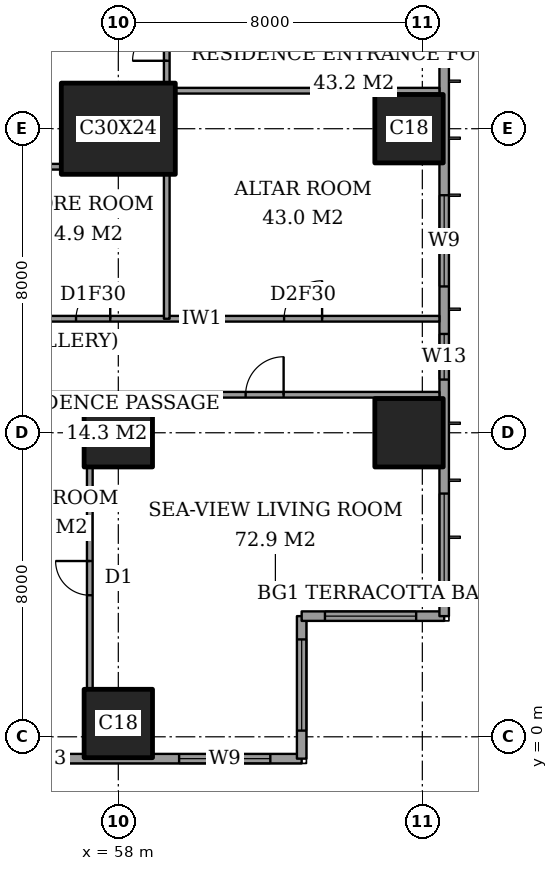
"""IFC4 building model, lengths in metres.
Left out: names, types, materials, properties, quantities, classifications, styles, units other than length and angle.
Written with IfcOpenShell. Run it as: python <this file> out.ifc"""

import sys

from ifc_helpers import new_model, si_unit, direction, frame, frame_2d, origin, origin_2d, place, context, subcontext, project, spatial, rectangle, extrude, element, fill, save


model = new_model("IFC4")
c1 = context("Model", 3, precision=1e-05, world=origin(), true_north=direction((0.0, 1.0)))
c2 = subcontext(c1, "Body", "Model", "MODEL_VIEW")
j1 = project(units=[si_unit("LENGTHUNIT", "METRE"), si_unit("PLANEANGLEUNIT", "RADIAN")], contexts=[c1])
p1 = place(None, origin())
s1 = spatial("IfcSite", under=j1, at=p1, CompositionType="ELEMENT")
p2 = place(p1, origin())
s2 = spatial("IfcBuilding", under=s1, at=p2, CompositionType="ELEMENT")
p3 = place(p2, frame((0.0, 0.0, 218.2)))
s3 = spatial("IfcBuildingStorey", under=s2, at=p3, CompositionType="ELEMENT", Elevation=218.2)
for number, where, z_axis, x_axis in (
    (1, (58.0, 0.35, 0.0), (0.0, 0.0, 1.0), (1.0, 0.0, 0.0)),
    (2, (58.0, 8.0, 0.0), (0.0, 0.0, 1.0), (1.0, 0.0, 0.0)),
):
    element("IfcColumn", number, at=place(p3, frame(where, z_axis=z_axis, x_axis=x_axis)), inside=s3, PredefinedType="COLUMN", context=c2, shape_type="SweptSolid", body=[
        extrude(rectangle(XDim=1.8, YDim=1.8, at=origin_2d()), origin(), (0.0, 0.0, 1.0), 3.6),
    ])
p4 = place(p3, frame((58.0, 16.0, 0.0), z_axis=(0.0, 0.0, 1.0), x_axis=(1.0, 0.0, 0.0)))
e3 = element("IfcColumn", 3, at=p4, inside=s3, PredefinedType="COLUMN", context=c2, shape_type="SweptSolid", body=[
    extrude(rectangle(XDim=3.0, YDim=2.4, at=origin_2d()), origin(), (0.0, 0.0, 1.0), 3.6),
])
for number, where, z_axis, x_axis in (
    (4, (65.65, 8.0, 0.0), (0.0, 0.0, 1.0), (1.0, 0.0, 0.0)),
    (5, (65.65, 16.0, 0.0), (0.0, 0.0, 1.0), (1.0, 0.0, 0.0)),
):
    element("IfcColumn", number, at=place(p3, frame(where, z_axis=z_axis, x_axis=x_axis)), inside=s3, PredefinedType="COLUMN", context=c2, shape_type="SweptSolid", body=[
        extrude(rectangle(XDim=1.8, YDim=1.8, at=origin_2d()), origin(), (0.0, 0.0, 1.0), 3.6),
    ])
p5 = place(p3, frame((41.425, -0.575, 0.0), z_axis=(0.0, 0.0, 1.0), x_axis=(1.0, 0.0, 0.0)))
e6 = element("IfcWall", 6, at=p5, inside=s3, PredefinedType="SOLIDWALL", context=c2, shape_type="SweptSolid", body=[
    extrude(rectangle(XDim=21.4, YDim=0.25, at=frame_2d((10.7, 0.0))), origin(), (0.0, 0.0, 1.0), 3.6),
])
p6 = place(p5, frame((2.65, 0.0, 0.2)))
e7 = element("IfcOpeningElement", 7, at=p6, cuts=e6, PredefinedType="OPENING", context=c2, shape_type="SweptSolid", body=[
    extrude(rectangle(XDim=1.2, YDim=2.4, at=frame_2d((0.6, 1.2))), frame((0.0, 0.135, 0.0), z_axis=(0.0, -1.0, 0.0), x_axis=(1.0, 0.0, 0.0)), (0.0, 0.0, 1.0), 0.27),
])
p7 = place(p5, frame((5.475, 0.0, 0.2)))
e8 = element("IfcOpeningElement", 8, at=p7, cuts=e6, PredefinedType="OPENING", context=c2, shape_type="SweptSolid", body=[
    extrude(rectangle(XDim=1.2, YDim=2.4, at=frame_2d((0.6, 1.2))), frame((0.0, 0.135, 0.0), z_axis=(0.0, -1.0, 0.0), x_axis=(1.0, 0.0, 0.0)), (0.0, 0.0, 1.0), 0.27),
])
p8 = place(p5, frame((10.325, 0.0, 0.2)))
e9 = element("IfcOpeningElement", 9, at=p8, cuts=e6, PredefinedType="OPENING", context=c2, shape_type="SweptSolid", body=[
    extrude(rectangle(XDim=2.4, YDim=2.4, at=frame_2d((1.2, 1.2))), frame((0.0, 0.135, 0.0), z_axis=(0.0, -1.0, 0.0), x_axis=(1.0, 0.0, 0.0)), (0.0, 0.0, 1.0), 0.27),
])
p9 = place(p5, frame((14.025, 0.0, 0.2)))
e10 = element("IfcOpeningElement", 10, at=p9, cuts=e6, PredefinedType="OPENING", context=c2, shape_type="SweptSolid", body=[
    extrude(rectangle(XDim=1.2, YDim=2.4, at=frame_2d((0.6, 1.2))), frame((0.0, 0.135, 0.0), z_axis=(0.0, -1.0, 0.0), x_axis=(1.0, 0.0, 0.0)), (0.0, 0.0, 1.0), 0.27),
])
p10 = place(p5, frame((18.175, 0.0, 0.2)))
e11 = element("IfcOpeningElement", 11, at=p10, cuts=e6, PredefinedType="OPENING", context=c2, shape_type="SweptSolid", body=[
    extrude(rectangle(XDim=2.4, YDim=2.4, at=frame_2d((1.2, 1.2))), frame((0.0, 0.135, 0.0), z_axis=(0.0, -1.0, 0.0), x_axis=(1.0, 0.0, 0.0)), (0.0, 0.0, 1.0), 0.27),
])
p11 = place(p3, frame((62.825, -0.575, 0.0), z_axis=(0.0, 0.0, 1.0), x_axis=(0.0, 1.0, 0.0)))
e12 = element("IfcWall", 12, at=p11, inside=s3, PredefinedType="SOLIDWALL", context=c2, shape_type="SweptSolid", body=[
    extrude(rectangle(XDim=3.75, YDim=0.25, at=frame_2d((1.875, 0.0))), origin(), (0.0, 0.0, 1.0), 3.6),
])
p12 = place(p11, frame((0.738, 0.0, 0.2)))
e13 = element("IfcOpeningElement", 13, at=p12, cuts=e12, PredefinedType="OPENING", context=c2, shape_type="SweptSolid", body=[
    extrude(rectangle(XDim=2.4, YDim=2.4, at=frame_2d((1.2, 1.2))), frame((0.0, 0.135, 0.0), z_axis=(0.0, -1.0, 0.0), x_axis=(1.0, 0.0, 0.0)), (0.0, 0.0, 1.0), 0.27),
])
p13 = place(p3, frame((62.825, 3.175, 0.0), z_axis=(0.0, 0.0, 1.0), x_axis=(1.0, 0.0, 0.0)))
e14 = element("IfcWall", 14, at=p13, inside=s3, PredefinedType="SOLIDWALL", context=c2, shape_type="SweptSolid", body=[
    extrude(rectangle(XDim=3.75, YDim=0.25, at=frame_2d((1.875, 0.0))), origin(), (0.0, 0.0, 1.0), 3.6),
])
p14 = place(p13, frame((0.613, 0.0, 0.2)))
e15 = element("IfcOpeningElement", 15, at=p14, cuts=e14, PredefinedType="OPENING", context=c2, shape_type="SweptSolid", body=[
    extrude(rectangle(XDim=2.4, YDim=2.4, at=frame_2d((1.2, 1.2))), frame((0.0, 0.135, 0.0), z_axis=(0.0, -1.0, 0.0), x_axis=(1.0, 0.0, 0.0)), (0.0, 0.0, 1.0), 0.27),
])
p15 = place(p3, frame((66.575, 3.175, 0.0), z_axis=(0.0, 0.0, 1.0), x_axis=(0.0, 1.0, 0.0)))
e16 = element("IfcWall", 16, at=p15, inside=s3, PredefinedType="SOLIDWALL", context=c2, shape_type="SweptSolid", body=[
    extrude(rectangle(XDim=41.65, YDim=0.25, at=frame_2d((20.825, 0.0))), origin(), (0.0, 0.0, 1.0), 3.6),
])
p16 = place(p15, frame((0.825, 0.0, 0.2)))
e17 = element("IfcOpeningElement", 17, at=p16, cuts=e16, PredefinedType="OPENING", context=c2, shape_type="SweptSolid", body=[
    extrude(rectangle(XDim=2.4, YDim=2.4, at=frame_2d((1.2, 1.2))), frame((0.0, 0.135, 0.0), z_axis=(0.0, -1.0, 0.0), x_axis=(1.0, 0.0, 0.0)), (0.0, 0.0, 1.0), 0.27),
])
p17 = place(p15, frame((6.225, 0.0, 0.2)))
e18 = element("IfcOpeningElement", 18, at=p17, cuts=e16, PredefinedType="OPENING", context=c2, shape_type="SweptSolid", body=[
    extrude(rectangle(XDim=1.2, YDim=2.4, at=frame_2d((0.6, 1.2))), frame((0.0, 0.135, 0.0), z_axis=(0.0, -1.0, 0.0), x_axis=(1.0, 0.0, 0.0)), (0.0, 0.0, 1.0), 0.27),
])
p18 = place(p15, frame((8.675, 0.0, 0.2)))
e19 = element("IfcOpeningElement", 19, at=p18, cuts=e16, PredefinedType="OPENING", context=c2, shape_type="SweptSolid", body=[
    extrude(rectangle(XDim=2.4, YDim=2.4, at=frame_2d((1.2, 1.2))), frame((0.0, 0.135, 0.0), z_axis=(0.0, -1.0, 0.0), x_axis=(1.0, 0.0, 0.0)), (0.0, 0.0, 1.0), 0.27),
])
p19 = place(p15, frame((15.675, 0.0, 0.2)))
e20 = element("IfcOpeningElement", 20, at=p19, cuts=e16, PredefinedType="OPENING", context=c2, shape_type="SweptSolid", body=[
    extrude(rectangle(XDim=2.4, YDim=2.4, at=frame_2d((1.2, 1.2))), frame((0.0, 0.135, 0.0), z_axis=(0.0, -1.0, 0.0), x_axis=(1.0, 0.0, 0.0)), (0.0, 0.0, 1.0), 0.27),
])
p20 = place(p15, frame((23.575, 0.0, 0.2)))
e21 = element("IfcOpeningElement", 21, at=p20, cuts=e16, PredefinedType="OPENING", context=c2, shape_type="SweptSolid", body=[
    extrude(rectangle(XDim=2.4, YDim=2.4, at=frame_2d((1.2, 1.2))), frame((0.0, 0.135, 0.0), z_axis=(0.0, -1.0, 0.0), x_axis=(1.0, 0.0, 0.0)), (0.0, 0.0, 1.0), 0.27),
])
p21 = place(p15, frame((30.775, 0.0, 0.2)))
e22 = element("IfcOpeningElement", 22, at=p21, cuts=e16, PredefinedType="OPENING", context=c2, shape_type="SweptSolid", body=[
    extrude(rectangle(XDim=2.4, YDim=2.4, at=frame_2d((1.2, 1.2))), frame((0.0, 0.135, 0.0), z_axis=(0.0, -1.0, 0.0), x_axis=(1.0, 0.0, 0.0)), (0.0, 0.0, 1.0), 0.27),
])
p22 = place(p15, frame((34.55, 0.0, 0.2)))
e23 = element("IfcOpeningElement", 23, at=p22, cuts=e16, PredefinedType="OPENING", context=c2, shape_type="SweptSolid", body=[
    extrude(rectangle(XDim=1.2, YDim=2.4, at=frame_2d((0.6, 1.2))), frame((0.0, 0.135, 0.0), z_axis=(0.0, -1.0, 0.0), x_axis=(1.0, 0.0, 0.0)), (0.0, 0.0, 1.0), 0.27),
])
p23 = place(p15, frame((38.425, 0.0, 0.2)))
e24 = element("IfcOpeningElement", 24, at=p23, cuts=e16, PredefinedType="OPENING", context=c2, shape_type="SweptSolid", body=[
    extrude(rectangle(XDim=2.4, YDim=2.4, at=frame_2d((1.2, 1.2))), frame((0.0, 0.135, 0.0), z_axis=(0.0, -1.0, 0.0), x_axis=(1.0, 0.0, 0.0)), (0.0, 0.0, 1.0), 0.27),
])
p24 = place(p3, frame((51.2, 9.0, 0.0), z_axis=(0.0, 0.0, 1.0), x_axis=(1.0, 0.0, 0.0)))
e25 = element("IfcWall", 25, at=p24, inside=s3, PredefinedType="PARTITIONING", context=c2, shape_type="SweptSolid", body=[
    extrude(rectangle(XDim=15.25, YDim=0.15, at=frame_2d((7.625, 0.0))), origin(), (0.0, 0.0, 1.0), 3.35),
])
p25 = place(p24, frame((10.15, 0.0, 0.0)))
e26 = element("IfcOpeningElement", 26, at=p25, cuts=e25, PredefinedType="OPENING", context=c2, shape_type="SweptSolid", body=[
    extrude(rectangle(XDim=1.0, YDim=2.1, at=frame_2d((0.5, 1.05))), frame((0.0, 0.085, 0.0), z_axis=(0.0, -1.0, 0.0), x_axis=(1.0, 0.0, 0.0)), (0.0, 0.0, 1.0), 0.17),
])
p26 = place(p24, frame((1.4, 0.0, 0.0)))
e27 = element("IfcOpeningElement", 27, at=p26, cuts=e25, PredefinedType="OPENING", context=c2, shape_type="SweptSolid", body=[
    extrude(rectangle(XDim=1.0, YDim=2.1, at=frame_2d((0.5, 1.05))), frame((0.0, 0.085, 0.0), z_axis=(0.0, -1.0, 0.0), x_axis=(1.0, 0.0, 0.0)), (0.0, 0.0, 1.0), 0.17),
])
p27 = place(p3, frame((41.439, 11.0, 0.0), z_axis=(0.0, 0.0, 1.0), x_axis=(1.0, 0.0, 0.0)))
e28 = element("IfcWall", 28, at=p27, inside=s3, PredefinedType="PARTITIONING", context=c2, shape_type="SweptSolid", body=[
    extrude(rectangle(XDim=25.011, YDim=0.15, at=frame_2d((12.505, 0.0))), origin(), (0.0, 0.0, 1.0), 3.35),
])
p28 = place(p27, frame((12.361, 0.0, 0.0)))
e29 = element("IfcOpeningElement", 29, at=p28, cuts=e28, PredefinedType="OPENING", context=c2, shape_type="SweptSolid", body=[
    extrude(rectangle(XDim=1.0, YDim=2.1, at=frame_2d((0.5, 1.05))), frame((0.0, 0.085, 0.0), z_axis=(0.0, -1.0, 0.0), x_axis=(1.0, 0.0, 0.0)), (0.0, 0.0, 1.0), 0.17),
])
p29 = place(p27, frame((20.924, 0.0, 0.0)))
e30 = element("IfcOpeningElement", 30, at=p29, cuts=e28, PredefinedType="OPENING", context=c2, shape_type="SweptSolid", body=[
    extrude(rectangle(XDim=1.0, YDim=2.1, at=frame_2d((0.5, 1.05))), frame((0.0, 0.085, 0.0), z_axis=(0.0, -1.0, 0.0), x_axis=(1.0, 0.0, 0.0)), (0.0, 0.0, 1.0), 0.17),
])
p30 = place(p27, frame((15.448, 0.0, 0.0)))
e31 = element("IfcOpeningElement", 31, at=p30, cuts=e28, PredefinedType="OPENING", context=c2, shape_type="SweptSolid", body=[
    extrude(rectangle(XDim=0.9, YDim=2.1, at=frame_2d((0.45, 1.05))), frame((0.0, 0.085, 0.0), z_axis=(0.0, -1.0, 0.0), x_axis=(1.0, 0.0, 0.0)), (0.0, 0.0, 1.0), 0.17),
])
p31 = place(p27, frame((9.961, 0.0, 0.0)))
e32 = element("IfcOpeningElement", 32, at=p31, cuts=e28, PredefinedType="OPENING", context=c2, shape_type="SweptSolid", body=[
    extrude(rectangle(XDim=1.0, YDim=2.1, at=frame_2d((0.5, 1.05))), frame((0.0, 0.085, 0.0), z_axis=(0.0, -1.0, 0.0), x_axis=(1.0, 0.0, 0.0)), (0.0, 0.0, 1.0), 0.17),
])
p32 = place(p27, frame((7.411, 0.0, 0.0)))
e33 = element("IfcOpeningElement", 33, at=p32, cuts=e28, PredefinedType="OPENING", context=c2, shape_type="SweptSolid", body=[
    extrude(rectangle(XDim=0.9, YDim=2.1, at=frame_2d((0.45, 1.05))), frame((0.0, 0.085, 0.0), z_axis=(0.0, -1.0, 0.0), x_axis=(1.0, 0.0, 0.0)), (0.0, 0.0, 1.0), 0.17),
])
p33 = place(p27, frame((2.836, 0.0, 0.0)))
e34 = element("IfcOpeningElement", 34, at=p33, cuts=e28, PredefinedType="OPENING", context=c2, shape_type="SweptSolid", body=[
    extrude(rectangle(XDim=1.0, YDim=2.1, at=frame_2d((0.5, 1.05))), frame((0.0, 0.085, 0.0), z_axis=(0.0, -1.0, 0.0), x_axis=(1.0, 0.0, 0.0)), (0.0, 0.0, 1.0), 0.17),
])
p34 = place(p3, frame((55.4, 15.0, 0.0), z_axis=(0.0, 0.0, 1.0), x_axis=(1.0, 0.0, 0.0)))
e35 = element("IfcWall", 35, at=p34, inside=s3, PredefinedType="PARTITIONING", context=c2, shape_type="SweptSolid", body=[
    extrude(rectangle(XDim=1.1, YDim=0.15, at=frame_2d((0.55, 0.0))), origin(), (0.0, 0.0, 1.0), 3.35),
])
p35 = place(p3, frame((59.5, 17.0, 0.0), z_axis=(0.0, 0.0, 1.0), x_axis=(1.0, 0.0, 0.0)))
e36 = element("IfcWall", 36, at=p35, inside=s3, PredefinedType="PARTITIONING", context=c2, shape_type="SweptSolid", body=[
    extrude(rectangle(XDim=6.95, YDim=0.15, at=frame_2d((3.475, 0.0))), origin(), (0.0, 0.0, 1.0), 3.35),
])
p36 = place(p3, frame((57.25, 1.25, 0.0), z_axis=(0.0, 0.0, 1.0), x_axis=(0.0, 1.0, 0.0)))
e37 = element("IfcWall", 37, at=p36, inside=s3, PredefinedType="PARTITIONING", context=c2, shape_type="SweptSolid", body=[
    extrude(rectangle(XDim=5.85, YDim=0.15, at=frame_2d((2.925, 0.0))), origin(), (0.0, 0.0, 1.0), 3.35),
])
p37 = place(p36, frame((2.475, 0.0, 0.0)))
e38 = element("IfcOpeningElement", 38, at=p37, cuts=e37, PredefinedType="OPENING", context=c2, shape_type="SweptSolid", body=[
    extrude(rectangle(XDim=0.9, YDim=2.1, at=frame_2d((0.45, 1.05))), frame((0.0, 0.085, 0.0), z_axis=(0.0, -1.0, 0.0), x_axis=(1.0, 0.0, 0.0)), (0.0, 0.0, 1.0), 0.17),
])
p38 = place(p3, frame((59.275, 11.0, 0.0), z_axis=(0.0, 0.0, 1.0), x_axis=(0.0, 1.0, 0.0)))
e39 = element("IfcWall", 39, at=p38, inside=s3, PredefinedType="PARTITIONING", context=c2, shape_type="SweptSolid", body=[
    extrude(rectangle(XDim=3.8, YDim=0.15, at=frame_2d((1.9, 0.0))), origin(), (0.0, 0.0, 1.0), 3.35),
])
p39 = place(p3, frame((59.275, 17.2, 0.0), z_axis=(0.0, 0.0, 1.0), x_axis=(0.0, 1.0, 0.0)))
e40 = element("IfcWall", 40, at=p39, inside=s3, PredefinedType="PARTITIONING", context=c2, shape_type="SweptSolid", body=[
    extrude(rectangle(XDim=2.45, YDim=0.15, at=frame_2d((1.225, 0.0))), origin(), (0.0, 0.0, 1.0), 3.35),
])
p40 = place(p39, frame((0.587, 0.0, 0.0)))
e41 = element("IfcOpeningElement", 41, at=p40, cuts=e40, PredefinedType="OPENING", context=c2, shape_type="SweptSolid", body=[
    extrude(rectangle(XDim=0.9, YDim=2.1, at=frame_2d((0.45, 1.05))), frame((0.0, 0.085, 0.0), z_axis=(0.0, -1.0, 0.0), x_axis=(1.0, 0.0, 0.0)), (0.0, 0.0, 1.0), 0.17),
])
p41 = place(p9, origin())
e42 = element("IfcWindow", 42, at=p41, inside=s3, PartitioningType="SINGLE_PANEL", PredefinedType="WINDOW", context=c2, shape_type="SweptSolid", body=[
    extrude(rectangle(XDim=1.2, YDim=2.4, at=frame_2d((0.6, 1.2))), frame((0.0, 0.03, 0.0), z_axis=(0.0, -1.0, 0.0), x_axis=(1.0, 0.0, 0.0)), (0.0, 0.0, 1.0), 0.06),
])
fill(e10, e42)
p42 = place(p10, origin())
e43 = element("IfcWindow", 43, at=p42, inside=s3, PartitioningType="SINGLE_PANEL", PredefinedType="WINDOW", context=c2, shape_type="SweptSolid", body=[
    extrude(rectangle(XDim=2.4, YDim=2.4, at=frame_2d((1.2, 1.2))), frame((0.0, 0.03, 0.0), z_axis=(0.0, -1.0, 0.0), x_axis=(1.0, 0.0, 0.0)), (0.0, 0.0, 1.0), 0.06),
])
fill(e11, e43)
p43 = place(p12, origin())
e44 = element("IfcWindow", 44, at=p43, inside=s3, PartitioningType="SINGLE_PANEL", PredefinedType="WINDOW", context=c2, shape_type="SweptSolid", body=[
    extrude(rectangle(XDim=2.4, YDim=2.4, at=frame_2d((1.2, 1.2))), frame((0.0, 0.03, 0.0), z_axis=(0.0, -1.0, 0.0), x_axis=(1.0, 0.0, 0.0)), (0.0, 0.0, 1.0), 0.06),
])
fill(e13, e44)
p44 = place(p14, origin())
e45 = element("IfcWindow", 45, at=p44, inside=s3, PartitioningType="SINGLE_PANEL", PredefinedType="WINDOW", context=c2, shape_type="SweptSolid", body=[
    extrude(rectangle(XDim=2.4, YDim=2.4, at=frame_2d((1.2, 1.2))), frame((0.0, 0.03, 0.0), z_axis=(0.0, -1.0, 0.0), x_axis=(1.0, 0.0, 0.0)), (0.0, 0.0, 1.0), 0.06),
])
fill(e15, e45)
p45 = place(p16, origin())
e46 = element("IfcWindow", 46, at=p45, inside=s3, PartitioningType="SINGLE_PANEL", PredefinedType="WINDOW", context=c2, shape_type="SweptSolid", body=[
    extrude(rectangle(XDim=2.4, YDim=2.4, at=frame_2d((1.2, 1.2))), frame((0.0, 0.03, 0.0), z_axis=(0.0, -1.0, 0.0), x_axis=(1.0, 0.0, 0.0)), (0.0, 0.0, 1.0), 0.06),
])
fill(e17, e46)
p46 = place(p17, origin())
e47 = element("IfcWindow", 47, at=p46, inside=s3, PartitioningType="SINGLE_PANEL", PredefinedType="WINDOW", context=c2, shape_type="SweptSolid", body=[
    extrude(rectangle(XDim=1.2, YDim=2.4, at=frame_2d((0.6, 1.2))), frame((0.0, 0.03, 0.0), z_axis=(0.0, -1.0, 0.0), x_axis=(1.0, 0.0, 0.0)), (0.0, 0.0, 1.0), 0.06),
])
fill(e18, e47)
p47 = place(p18, origin())
e48 = element("IfcWindow", 48, at=p47, inside=s3, PartitioningType="SINGLE_PANEL", PredefinedType="WINDOW", context=c2, shape_type="SweptSolid", body=[
    extrude(rectangle(XDim=2.4, YDim=2.4, at=frame_2d((1.2, 1.2))), frame((0.0, 0.03, 0.0), z_axis=(0.0, -1.0, 0.0), x_axis=(1.0, 0.0, 0.0)), (0.0, 0.0, 1.0), 0.06),
])
fill(e19, e48)
p48 = place(p25, origin())
e49 = element("IfcDoor", 49, at=p48, inside=s3, OperationType="SINGLE_SWING_LEFT", PredefinedType="DOOR", context=c2, shape_type="SweptSolid", body=[
    extrude(rectangle(XDim=1.0, YDim=2.1, at=frame_2d((0.5, 1.05))), frame((0.0, 0.025, 0.0), z_axis=(0.0, -1.0, 0.0), x_axis=(1.0, 0.0, 0.0)), (0.0, 0.0, 1.0), 0.05),
])
fill(e26, e49)
p49 = place(p37, origin())
e50 = element("IfcDoor", 50, at=p49, inside=s3, OperationType="SINGLE_SWING_LEFT", PredefinedType="DOOR", context=c2, shape_type="SweptSolid", body=[
    extrude(rectangle(XDim=0.9, YDim=2.1, at=frame_2d((0.45, 1.05))), frame((0.0, 0.025, 0.0), z_axis=(0.0, -1.0, 0.0), x_axis=(1.0, 0.0, 0.0)), (0.0, 0.0, 1.0), 0.05),
])
fill(e38, e50)
p50 = place(p29, origin())
e51 = element("IfcDoor", 51, at=p50, inside=s3, OperationType="SINGLE_SWING_LEFT", PredefinedType="DOOR", context=c2, shape_type="SweptSolid", body=[
    extrude(rectangle(XDim=1.0, YDim=2.1, at=frame_2d((0.5, 1.05))), frame((0.0, 0.025, 0.0), z_axis=(0.0, -1.0, 0.0), x_axis=(1.0, 0.0, 0.0)), (0.0, 0.0, 1.0), 0.05),
])
fill(e30, e51)
p51 = place(p40, origin())
e52 = element("IfcDoor", 52, at=p51, inside=s3, OperationType="SINGLE_SWING_RIGHT", PredefinedType="DOOR", context=c2, shape_type="SweptSolid", body=[
    extrude(rectangle(XDim=0.9, YDim=2.1, at=frame_2d((0.45, 1.05))), frame((0.0, 0.025, 0.0), z_axis=(0.0, -1.0, 0.0), x_axis=(1.0, 0.0, 0.0)), (0.0, 0.0, 1.0), 0.05),
])
fill(e41, e52)
p52 = place(p30, origin())
e53 = element("IfcDoor", 53, at=p52, inside=s3, OperationType="SINGLE_SWING_LEFT", PredefinedType="DOOR", context=c2, shape_type="SweptSolid", body=[
    extrude(rectangle(XDim=0.9, YDim=2.1, at=frame_2d((0.45, 1.05))), frame((0.0, 0.025, 0.0), z_axis=(0.0, -1.0, 0.0), x_axis=(1.0, 0.0, 0.0)), (0.0, 0.0, 1.0), 0.05),
])
fill(e31, e53)
save(model, sys.argv[1])
